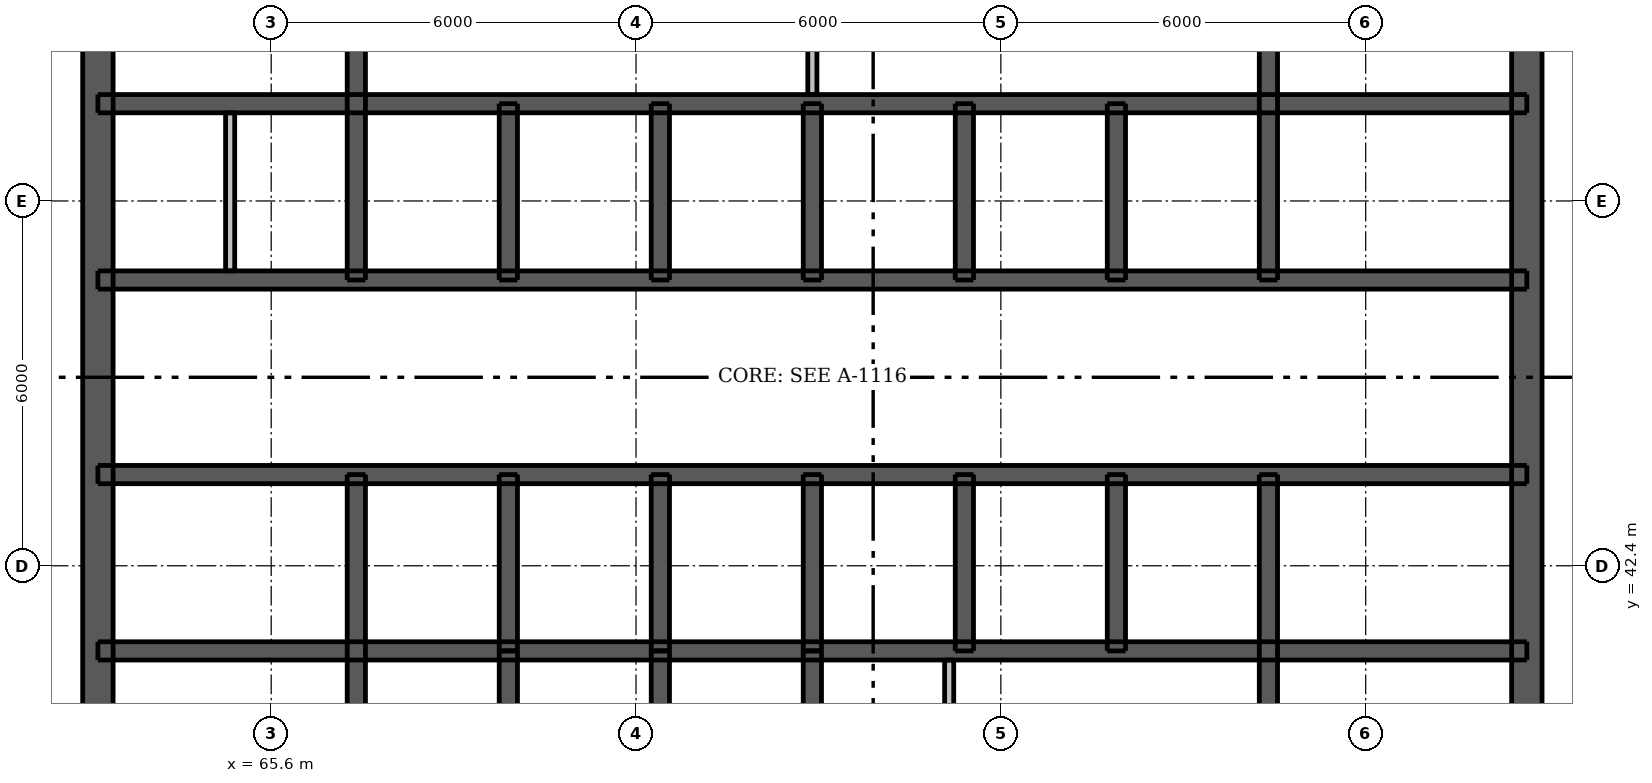
"""IFC4 building model, lengths in metres.
Left out: names, types, materials, properties, quantities, classifications, styles, units other than length and angle.
Written with IfcOpenShell. Run it as: python <this file> out.ifc"""

import sys

from ifc_helpers import new_model, si_unit, direction, frame, frame_2d, origin, place, context, subcontext, project, spatial, rectangle, extrude, element, fill, save


model = new_model("IFC4")
c1 = context("Model", 3, precision=1e-05, world=origin(), true_north=direction((0.0, 1.0)))
c2 = subcontext(c1, "Body", "Model", "MODEL_VIEW")
j1 = project(units=[si_unit("LENGTHUNIT", "METRE"), si_unit("PLANEANGLEUNIT", "RADIAN")], contexts=[c1])
p1 = place(None, origin())
s1 = spatial("IfcSite", under=j1, at=p1, CompositionType="ELEMENT")
p2 = place(p1, origin())
s2 = spatial("IfcBuilding", under=s1, at=p2, CompositionType="ELEMENT")
p3 = place(p2, frame((0.0, 0.0, 245.5)))
s3 = spatial("IfcBuildingStorey", under=s2, at=p3, CompositionType="ELEMENT", Elevation=245.5)
p4 = place(p3, frame((62.75, 33.5, 0.0), z_axis=(0.0, 0.0, 1.0), x_axis=(0.0, 1.0, 0.0)))
e1 = element("IfcWall", 1, at=p4, inside=s3, PredefinedType="SHEAR", context=c2, shape_type="SweptSolid", body=[
    extrude(rectangle(XDim=24.0, YDim=0.5, at=frame_2d((12.0, 0.0))), origin(), (0.0, 0.0, 1.0), 3.05),
])
p5 = place(p4, frame((11.2, 0.0, 0.0)))
e2 = element("IfcOpeningElement", 2, at=p5, cuts=e1, PredefinedType="OPENING", context=c2, shape_type="SweptSolid", body=[
    extrude(rectangle(XDim=1.6, YDim=2.1, at=frame_2d((0.8, 1.05))), frame((0.0, 0.26, 0.0), z_axis=(0.0, -1.0, 0.0), x_axis=(1.0, 0.0, 0.0)), (0.0, 0.0, 1.0), 0.52),
])
p6 = place(p3, frame((86.25, 33.5, 0.0), z_axis=(0.0, 0.0, 1.0), x_axis=(0.0, 1.0, 0.0)))
e3 = element("IfcWall", 3, at=p6, inside=s3, PredefinedType="SHEAR", context=c2, shape_type="SweptSolid", body=[
    extrude(rectangle(XDim=24.0, YDim=0.5, at=frame_2d((12.0, 0.0))), origin(), (0.0, 0.0, 1.0), 3.05),
])
p7 = place(p6, frame((11.2, 0.0, 0.0)))
e4 = element("IfcOpeningElement", 4, at=p7, cuts=e3, PredefinedType="OPENING", context=c2, shape_type="SweptSolid", body=[
    extrude(rectangle(XDim=1.6, YDim=2.1, at=frame_2d((0.8, 1.05))), frame((0.0, 0.26, 0.0), z_axis=(0.0, -1.0, 0.0), x_axis=(1.0, 0.0, 0.0)), (0.0, 0.0, 1.0), 0.52),
])
p8 = place(p3, frame((62.75, 41.0, 0.0), z_axis=(0.0, 0.0, 1.0), x_axis=(1.0, 0.0, 0.0)))
e5 = element("IfcWall", 5, at=p8, inside=s3, PredefinedType="SHEAR", context=c2, shape_type="SweptSolid", body=[
    extrude(rectangle(XDim=23.5, YDim=0.3, at=frame_2d((11.75, 0.0))), origin(), (0.0, 0.0, 1.0), 3.05),
])
p9 = place(p3, frame((62.75, 43.9, 0.0), z_axis=(0.0, 0.0, 1.0), x_axis=(1.0, 0.0, 0.0)))
e6 = element("IfcWall", 6, at=p9, inside=s3, PredefinedType="SHEAR", context=c2, shape_type="SweptSolid", body=[
    extrude(rectangle(XDim=23.5, YDim=0.3, at=frame_2d((11.75, 0.0))), origin(), (0.0, 0.0, 1.0), 3.05),
])
p10 = place(p9, frame((1.725, 0.0, 0.0)))
e7 = element("IfcOpeningElement", 7, at=p10, cuts=e6, PredefinedType="OPENING", context=c2, shape_type="SweptSolid", body=[
    extrude(rectangle(XDim=0.9, YDim=2.1, at=frame_2d((0.45, 1.05))), frame((0.0, 0.16, 0.0), z_axis=(0.0, -1.0, 0.0), x_axis=(1.0, 0.0, 0.0)), (0.0, 0.0, 1.0), 0.32),
])
p11 = place(p9, frame((20.875, 0.0, 0.0)))
e8 = element("IfcOpeningElement", 8, at=p11, cuts=e6, PredefinedType="OPENING", context=c2, shape_type="SweptSolid", body=[
    extrude(rectangle(XDim=0.9, YDim=2.1, at=frame_2d((0.45, 1.05))), frame((0.0, 0.16, 0.0), z_axis=(0.0, -1.0, 0.0), x_axis=(1.0, 0.0, 0.0)), (0.0, 0.0, 1.0), 0.32),
])
p12 = place(p9, frame((7.55, 0.0, 0.0)))
e9 = element("IfcOpeningElement", 9, at=p12, cuts=e6, PredefinedType="OPENING", context=c2, shape_type="SweptSolid", body=[
    extrude(rectangle(XDim=0.9, YDim=2.1, at=frame_2d((0.45, 1.05))), frame((0.0, 0.16, 0.0), z_axis=(0.0, -1.0, 0.0), x_axis=(1.0, 0.0, 0.0)), (0.0, 0.0, 1.0), 0.32),
])
p13 = place(p9, frame((10.05, 0.0, 0.0)))
e10 = element("IfcOpeningElement", 10, at=p13, cuts=e6, PredefinedType="OPENING", context=c2, shape_type="SweptSolid", body=[
    extrude(rectangle(XDim=0.9, YDim=2.1, at=frame_2d((0.45, 1.05))), frame((0.0, 0.16, 0.0), z_axis=(0.0, -1.0, 0.0), x_axis=(1.0, 0.0, 0.0)), (0.0, 0.0, 1.0), 0.32),
])
p14 = place(p9, frame((15.05, 0.0, 0.0)))
e11 = element("IfcOpeningElement", 11, at=p14, cuts=e6, PredefinedType="OPENING", context=c2, shape_type="SweptSolid", body=[
    extrude(rectangle(XDim=0.9, YDim=2.1, at=frame_2d((0.45, 1.05))), frame((0.0, 0.16, 0.0), z_axis=(0.0, -1.0, 0.0), x_axis=(1.0, 0.0, 0.0)), (0.0, 0.0, 1.0), 0.32),
])
p15 = place(p9, frame((17.55, 0.0, 0.0)))
e12 = element("IfcOpeningElement", 12, at=p15, cuts=e6, PredefinedType="OPENING", context=c2, shape_type="SweptSolid", body=[
    extrude(rectangle(XDim=0.9, YDim=2.1, at=frame_2d((0.45, 1.05))), frame((0.0, 0.16, 0.0), z_axis=(0.0, -1.0, 0.0), x_axis=(1.0, 0.0, 0.0)), (0.0, 0.0, 1.0), 0.32),
])
p16 = place(p3, frame((62.75, 47.1, 0.0), z_axis=(0.0, 0.0, 1.0), x_axis=(1.0, 0.0, 0.0)))
e13 = element("IfcWall", 13, at=p16, inside=s3, PredefinedType="SHEAR", context=c2, shape_type="SweptSolid", body=[
    extrude(rectangle(XDim=23.5, YDim=0.3, at=frame_2d((11.75, 0.0))), origin(), (0.0, 0.0, 1.0), 3.05),
])
p17 = place(p16, frame((0.762, 0.0, 0.0)))
e14 = element("IfcOpeningElement", 14, at=p17, cuts=e13, PredefinedType="OPENING", context=c2, shape_type="SweptSolid", body=[
    extrude(rectangle(XDim=0.9, YDim=2.1, at=frame_2d((0.45, 1.05))), frame((0.0, 0.16, 0.0), z_axis=(0.0, -1.0, 0.0), x_axis=(1.0, 0.0, 0.0)), (0.0, 0.0, 1.0), 0.32),
])
p18 = place(p16, frame((2.688, 0.0, 0.0)))
e15 = element("IfcOpeningElement", 15, at=p18, cuts=e13, PredefinedType="OPENING", context=c2, shape_type="SweptSolid", body=[
    extrude(rectangle(XDim=0.9, YDim=2.1, at=frame_2d((0.45, 1.05))), frame((0.0, 0.16, 0.0), z_axis=(0.0, -1.0, 0.0), x_axis=(1.0, 0.0, 0.0)), (0.0, 0.0, 1.0), 0.32),
])
p19 = place(p16, frame((20.875, 0.0, 0.0)))
e16 = element("IfcOpeningElement", 16, at=p19, cuts=e13, PredefinedType="OPENING", context=c2, shape_type="SweptSolid", body=[
    extrude(rectangle(XDim=0.9, YDim=2.1, at=frame_2d((0.45, 1.05))), frame((0.0, 0.16, 0.0), z_axis=(0.0, -1.0, 0.0), x_axis=(1.0, 0.0, 0.0)), (0.0, 0.0, 1.0), 0.32),
])
p20 = place(p16, frame((4.95, 0.0, 0.0)))
e17 = element("IfcOpeningElement", 17, at=p20, cuts=e13, PredefinedType="OPENING", context=c2, shape_type="SweptSolid", body=[
    extrude(rectangle(XDim=1.1, YDim=2.1, at=frame_2d((0.55, 1.05))), frame((0.0, 0.16, 0.0), z_axis=(0.0, -1.0, 0.0), x_axis=(1.0, 0.0, 0.0)), (0.0, 0.0, 1.0), 0.32),
])
p21 = place(p16, frame((7.45, 0.0, 0.0)))
e18 = element("IfcOpeningElement", 18, at=p21, cuts=e13, PredefinedType="OPENING", context=c2, shape_type="SweptSolid", body=[
    extrude(rectangle(XDim=1.1, YDim=2.1, at=frame_2d((0.55, 1.05))), frame((0.0, 0.16, 0.0), z_axis=(0.0, -1.0, 0.0), x_axis=(1.0, 0.0, 0.0)), (0.0, 0.0, 1.0), 0.32),
])
p22 = place(p16, frame((9.95, 0.0, 0.0)))
e19 = element("IfcOpeningElement", 19, at=p22, cuts=e13, PredefinedType="OPENING", context=c2, shape_type="SweptSolid", body=[
    extrude(rectangle(XDim=1.1, YDim=2.1, at=frame_2d((0.55, 1.05))), frame((0.0, 0.16, 0.0), z_axis=(0.0, -1.0, 0.0), x_axis=(1.0, 0.0, 0.0)), (0.0, 0.0, 1.0), 0.32),
])
p23 = place(p16, frame((12.45, 0.0, 0.0)))
e20 = element("IfcOpeningElement", 20, at=p23, cuts=e13, PredefinedType="OPENING", context=c2, shape_type="SweptSolid", body=[
    extrude(rectangle(XDim=1.1, YDim=2.1, at=frame_2d((0.55, 1.05))), frame((0.0, 0.16, 0.0), z_axis=(0.0, -1.0, 0.0), x_axis=(1.0, 0.0, 0.0)), (0.0, 0.0, 1.0), 0.32),
])
p24 = place(p16, frame((14.95, 0.0, 0.0)))
e21 = element("IfcOpeningElement", 21, at=p24, cuts=e13, PredefinedType="OPENING", context=c2, shape_type="SweptSolid", body=[
    extrude(rectangle(XDim=1.1, YDim=2.1, at=frame_2d((0.55, 1.05))), frame((0.0, 0.16, 0.0), z_axis=(0.0, -1.0, 0.0), x_axis=(1.0, 0.0, 0.0)), (0.0, 0.0, 1.0), 0.32),
])
p25 = place(p16, frame((17.45, 0.0, 0.0)))
e22 = element("IfcOpeningElement", 22, at=p25, cuts=e13, PredefinedType="OPENING", context=c2, shape_type="SweptSolid", body=[
    extrude(rectangle(XDim=1.1, YDim=2.1, at=frame_2d((0.55, 1.05))), frame((0.0, 0.16, 0.0), z_axis=(0.0, -1.0, 0.0), x_axis=(1.0, 0.0, 0.0)), (0.0, 0.0, 1.0), 0.32),
])
p26 = place(p3, frame((62.75, 50.0, 0.0), z_axis=(0.0, 0.0, 1.0), x_axis=(1.0, 0.0, 0.0)))
e23 = element("IfcWall", 23, at=p26, inside=s3, PredefinedType="SHEAR", context=c2, shape_type="SweptSolid", body=[
    extrude(rectangle(XDim=23.5, YDim=0.3, at=frame_2d((11.75, 0.0))), origin(), (0.0, 0.0, 1.0), 3.05),
])
p27 = place(p3, frame((67.0, 33.75, 0.0), z_axis=(0.0, 0.0, 1.0), x_axis=(0.0, 1.0, 0.0)))
e24 = element("IfcWall", 24, at=p27, inside=s3, PredefinedType="SHEAR", context=c2, shape_type="SweptSolid", body=[
    extrude(rectangle(XDim=10.15, YDim=0.3, at=frame_2d((5.075, 0.0))), origin(), (0.0, 0.0, 1.0), 3.05),
])
p28 = place(p27, frame((0.45, 0.0, 0.0)))
e25 = element("IfcOpeningElement", 25, at=p28, cuts=e24, PredefinedType="OPENING", context=c2, shape_type="SweptSolid", body=[
    extrude(rectangle(XDim=1.1, YDim=2.1, at=frame_2d((0.55, 1.05))), frame((0.0, 0.16, 0.0), z_axis=(0.0, -1.0, 0.0), x_axis=(1.0, 0.0, 0.0)), (0.0, 0.0, 1.0), 0.32),
])
for number, where, z_axis, x_axis in (
    (26, (67.0, 47.1, 0.0), (0.0, 0.0, 1.0), (0.0, 1.0, 0.0)),
    (27, (82.0, 33.75, 0.0), (0.0, 0.0, 1.0), (0.0, 1.0, 0.0)),
    (28, (82.0, 47.1, 0.0), (0.0, 0.0, 1.0), (0.0, 1.0, 0.0)),
):
    element("IfcWall", number, at=place(p3, frame(where, z_axis=z_axis, x_axis=x_axis)), inside=s3, PredefinedType="SHEAR", context=c2, shape_type="SweptSolid", body=[
        extrude(rectangle(XDim=10.15, YDim=0.3, at=frame_2d((5.075, 0.0))), origin(), (0.0, 0.0, 1.0), 3.05),
    ])
for number, where, z_axis, x_axis in (
    (29, (69.5, 41.0, 0.0), (0.0, 0.0, 1.0), (0.0, 1.0, 0.0)),
    (30, (69.5, 47.1, 0.0), (0.0, 0.0, 1.0), (0.0, 1.0, 0.0)),
    (31, (72.0, 41.0, 0.0), (0.0, 0.0, 1.0), (0.0, 1.0, 0.0)),
    (32, (72.0, 47.1, 0.0), (0.0, 0.0, 1.0), (0.0, 1.0, 0.0)),
    (33, (74.5, 41.0, 0.0), (0.0, 0.0, 1.0), (0.0, 1.0, 0.0)),
    (34, (74.5, 47.1, 0.0), (0.0, 0.0, 1.0), (0.0, 1.0, 0.0)),
    (35, (77.0, 41.0, 0.0), (0.0, 0.0, 1.0), (0.0, 1.0, 0.0)),
    (36, (77.0, 47.1, 0.0), (0.0, 0.0, 1.0), (0.0, 1.0, 0.0)),
    (37, (79.5, 41.0, 0.0), (0.0, 0.0, 1.0), (0.0, 1.0, 0.0)),
    (38, (79.5, 47.1, 0.0), (0.0, 0.0, 1.0), (0.0, 1.0, 0.0)),
    (39, (69.5, 38.1, 0.0), (0.0, 0.0, 1.0), (0.0, 1.0, 0.0)),
    (40, (72.0, 38.1, 0.0), (0.0, 0.0, 1.0), (0.0, 1.0, 0.0)),
    (41, (74.5, 38.1, 0.0), (0.0, 0.0, 1.0), (0.0, 1.0, 0.0)),
):
    element("IfcWall", number, at=place(p3, frame(where, z_axis=z_axis, x_axis=x_axis)), inside=s3, PredefinedType="SHEAR", context=c2, shape_type="SweptSolid", body=[
        extrude(rectangle(XDim=2.9, YDim=0.3, at=frame_2d((1.45, 0.0))), origin(), (0.0, 0.0, 1.0), 3.05),
    ])
p29 = place(p3, frame((76.75, 34.0, 0.0), z_axis=(0.0, 0.0, 1.0), x_axis=(0.0, 1.0, 0.0)))
e42 = element("IfcWall", 42, at=p29, inside=s3, PredefinedType="PLUMBINGWALL", context=c2, shape_type="SweptSolid", body=[
    extrude(rectangle(XDim=6.85, YDim=0.15, at=frame_2d((3.425, 0.0))), origin(), (0.0, 0.0, 1.0), 3.05),
])
p30 = place(p3, frame((64.925, 47.25, 0.0), z_axis=(0.0, 0.0, 1.0), x_axis=(0.0, 1.0, 0.0)))
e43 = element("IfcWall", 43, at=p30, inside=s3, PredefinedType="PLUMBINGWALL", context=c2, shape_type="SweptSolid", body=[
    extrude(rectangle(XDim=2.6, YDim=0.15, at=frame_2d((1.3, 0.0))), origin(), (0.0, 0.0, 1.0), 3.05),
])
p31 = place(p3, frame((74.5, 50.15, 0.0), z_axis=(0.0, 0.0, 1.0), x_axis=(0.0, 1.0, 0.0)))
e44 = element("IfcWall", 44, at=p31, inside=s3, PredefinedType="PLUMBINGWALL", context=c2, shape_type="SweptSolid", body=[
    extrude(rectangle(XDim=6.85, YDim=0.15, at=frame_2d((3.425, 0.0))), origin(), (0.0, 0.0, 1.0), 3.05),
])
p32 = place(p5, origin())
e45 = element("IfcDoor", 45, at=p32, inside=s3, OperationType="DOUBLE_DOOR_SINGLE_SWING", PredefinedType="DOOR", context=c2, shape_type="SweptSolid", body=[
    extrude(rectangle(XDim=1.6, YDim=2.1, at=frame_2d((0.8, 1.05))), frame((0.0, -0.188, 0.0), z_axis=(0.0, -1.0, 0.0), x_axis=(1.0, 0.0, 0.0)), (0.0, 0.0, 1.0), 0.05),
])
fill(e2, e45)
p33 = place(p7, origin())
e46 = element("IfcDoor", 46, at=p33, inside=s3, OperationType="DOUBLE_DOOR_SINGLE_SWING", PredefinedType="DOOR", context=c2, shape_type="SweptSolid", body=[
    extrude(rectangle(XDim=1.6, YDim=2.1, at=frame_2d((0.8, 1.05))), frame((0.0, 0.237, 0.0), z_axis=(0.0, -1.0, 0.0), x_axis=(1.0, 0.0, 0.0)), (0.0, 0.0, 1.0), 0.05),
])
fill(e4, e46)
p34 = place(p10, origin())
e47 = element("IfcDoor", 47, at=p34, inside=s3, OperationType="SINGLE_SWING_LEFT", PredefinedType="DOOR", context=c2, shape_type="SweptSolid", body=[
    extrude(rectangle(XDim=0.9, YDim=2.1, at=frame_2d((0.45, 1.05))), frame((0.0, -0.087, 0.0), z_axis=(0.0, -1.0, 0.0), x_axis=(1.0, 0.0, 0.0)), (0.0, 0.0, 1.0), 0.05),
])
fill(e7, e47)
p35 = place(p11, origin())
e48 = element("IfcDoor", 48, at=p35, inside=s3, OperationType="SINGLE_SWING_LEFT", PredefinedType="DOOR", context=c2, shape_type="SweptSolid", body=[
    extrude(rectangle(XDim=0.9, YDim=2.1, at=frame_2d((0.45, 1.05))), frame((0.0, -0.087, 0.0), z_axis=(0.0, -1.0, 0.0), x_axis=(1.0, 0.0, 0.0)), (0.0, 0.0, 1.0), 0.05),
])
fill(e8, e48)
p36 = place(p17, origin())
e49 = element("IfcDoor", 49, at=p36, inside=s3, OperationType="SINGLE_SWING_LEFT", PredefinedType="DOOR", context=c2, shape_type="SweptSolid", body=[
    extrude(rectangle(XDim=0.9, YDim=2.1, at=frame_2d((0.45, 1.05))), frame((0.0, 0.138, 0.0), z_axis=(0.0, -1.0, 0.0), x_axis=(1.0, 0.0, 0.0)), (0.0, 0.0, 1.0), 0.05),
])
fill(e14, e49)
p37 = place(p18, origin())
e50 = element("IfcDoor", 50, at=p37, inside=s3, OperationType="SINGLE_SWING_RIGHT", PredefinedType="DOOR", context=c2, shape_type="SweptSolid", body=[
    extrude(rectangle(XDim=0.9, YDim=2.1, at=frame_2d((0.45, 1.05))), frame((0.0, 0.138, 0.0), z_axis=(0.0, -1.0, 0.0), x_axis=(1.0, 0.0, 0.0)), (0.0, 0.0, 1.0), 0.05),
])
fill(e15, e50)
p38 = place(p19, origin())
e51 = element("IfcDoor", 51, at=p38, inside=s3, OperationType="SINGLE_SWING_LEFT", PredefinedType="DOOR", context=c2, shape_type="SweptSolid", body=[
    extrude(rectangle(XDim=0.9, YDim=2.1, at=frame_2d((0.45, 1.05))), frame((0.0, 0.138, 0.0), z_axis=(0.0, -1.0, 0.0), x_axis=(1.0, 0.0, 0.0)), (0.0, 0.0, 1.0), 0.05),
])
fill(e16, e51)
p39 = place(p12, origin())
e52 = element("IfcDoor", 52, at=p39, inside=s3, OperationType="SINGLE_SWING_LEFT", PredefinedType="DOOR", context=c2, shape_type="SweptSolid", body=[
    extrude(rectangle(XDim=0.9, YDim=2.1, at=frame_2d((0.45, 1.05))), frame((0.0, -0.087, 0.0), z_axis=(0.0, -1.0, 0.0), x_axis=(1.0, 0.0, 0.0)), (0.0, 0.0, 1.0), 0.05),
])
fill(e9, e52)
p40 = place(p13, origin())
e53 = element("IfcDoor", 53, at=p40, inside=s3, OperationType="SINGLE_SWING_RIGHT", PredefinedType="DOOR", context=c2, shape_type="SweptSolid", body=[
    extrude(rectangle(XDim=0.9, YDim=2.1, at=frame_2d((0.45, 1.05))), frame((0.0, -0.087, 0.0), z_axis=(0.0, -1.0, 0.0), x_axis=(1.0, 0.0, 0.0)), (0.0, 0.0, 1.0), 0.05),
])
fill(e10, e53)
p41 = place(p14, origin())
e54 = element("IfcDoor", 54, at=p41, inside=s3, OperationType="SINGLE_SWING_RIGHT", PredefinedType="DOOR", context=c2, shape_type="SweptSolid", body=[
    extrude(rectangle(XDim=0.9, YDim=2.1, at=frame_2d((0.45, 1.05))), frame((0.0, -0.087, 0.0), z_axis=(0.0, -1.0, 0.0), x_axis=(1.0, 0.0, 0.0)), (0.0, 0.0, 1.0), 0.05),
])
fill(e11, e54)
p42 = place(p15, origin())
e55 = element("IfcDoor", 55, at=p42, inside=s3, OperationType="SINGLE_SWING_LEFT", PredefinedType="DOOR", context=c2, shape_type="SweptSolid", body=[
    extrude(rectangle(XDim=0.9, YDim=2.1, at=frame_2d((0.45, 1.05))), frame((0.0, -0.087, 0.0), z_axis=(0.0, -1.0, 0.0), x_axis=(1.0, 0.0, 0.0)), (0.0, 0.0, 1.0), 0.05),
])
fill(e12, e55)
p43 = place(p20, origin())
e56 = element("IfcDoor", 56, at=p43, inside=s3, OperationType="DOUBLE_DOOR_SLIDING", PredefinedType="DOOR", context=c2, shape_type="SweptSolid", body=[
    extrude(rectangle(XDim=1.1, YDim=2.1, at=frame_2d((0.55, 1.05))), frame((0.0, 0.025, 0.0), z_axis=(0.0, -1.0, 0.0), x_axis=(1.0, 0.0, 0.0)), (0.0, 0.0, 1.0), 0.05),
])
fill(e17, e56)
p44 = place(p21, origin())
e57 = element("IfcDoor", 57, at=p44, inside=s3, OperationType="DOUBLE_DOOR_SLIDING", PredefinedType="DOOR", context=c2, shape_type="SweptSolid", body=[
    extrude(rectangle(XDim=1.1, YDim=2.1, at=frame_2d((0.55, 1.05))), frame((0.0, 0.025, 0.0), z_axis=(0.0, -1.0, 0.0), x_axis=(1.0, 0.0, 0.0)), (0.0, 0.0, 1.0), 0.05),
])
fill(e18, e57)
p45 = place(p22, origin())
e58 = element("IfcDoor", 58, at=p45, inside=s3, OperationType="DOUBLE_DOOR_SLIDING", PredefinedType="DOOR", context=c2, shape_type="SweptSolid", body=[
    extrude(rectangle(XDim=1.1, YDim=2.1, at=frame_2d((0.55, 1.05))), frame((0.0, 0.025, 0.0), z_axis=(0.0, -1.0, 0.0), x_axis=(1.0, 0.0, 0.0)), (0.0, 0.0, 1.0), 0.05),
])
fill(e19, e58)
p46 = place(p23, origin())
e59 = element("IfcDoor", 59, at=p46, inside=s3, OperationType="DOUBLE_DOOR_SLIDING", PredefinedType="DOOR", context=c2, shape_type="SweptSolid", body=[
    extrude(rectangle(XDim=1.1, YDim=2.1, at=frame_2d((0.55, 1.05))), frame((0.0, 0.025, 0.0), z_axis=(0.0, -1.0, 0.0), x_axis=(1.0, 0.0, 0.0)), (0.0, 0.0, 1.0), 0.05),
])
fill(e20, e59)
p47 = place(p24, origin())
e60 = element("IfcDoor", 60, at=p47, inside=s3, OperationType="DOUBLE_DOOR_SLIDING", PredefinedType="DOOR", context=c2, shape_type="SweptSolid", body=[
    extrude(rectangle(XDim=1.1, YDim=2.1, at=frame_2d((0.55, 1.05))), frame((0.0, 0.025, 0.0), z_axis=(0.0, -1.0, 0.0), x_axis=(1.0, 0.0, 0.0)), (0.0, 0.0, 1.0), 0.05),
])
fill(e21, e60)
p48 = place(p25, origin())
e61 = element("IfcDoor", 61, at=p48, inside=s3, OperationType="DOUBLE_DOOR_SLIDING", PredefinedType="DOOR", context=c2, shape_type="SweptSolid", body=[
    extrude(rectangle(XDim=1.1, YDim=2.1, at=frame_2d((0.55, 1.05))), frame((0.0, 0.025, 0.0), z_axis=(0.0, -1.0, 0.0), x_axis=(1.0, 0.0, 0.0)), (0.0, 0.0, 1.0), 0.05),
])
fill(e22, e61)
save(model, sys.argv[1])
